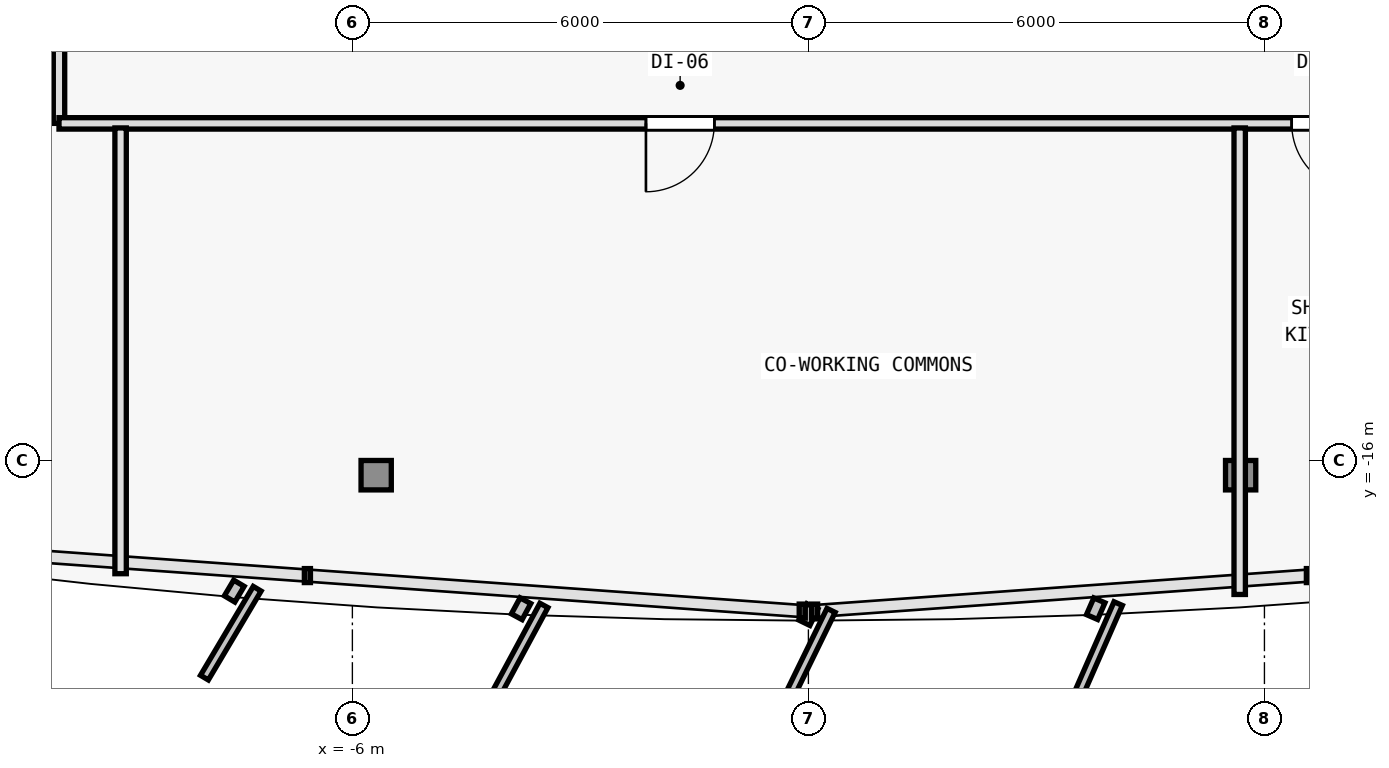
"""IFC4 building model, lengths in metres.
Left out: names, types, materials, properties, quantities, classifications, styles, units other than length and angle.
Written with IfcOpenShell. Run it as: python <this file> out.ifc"""

import sys

from ifc_helpers import new_model, si_unit, direction, frame, frame_2d, origin, origin_2d, place, context, subcontext, project, spatial, rectangle, i_section, extrude, element, fill, save


model = new_model("IFC4")
c1 = context("Model", 3, precision=1e-05, world=origin(), true_north=direction((0.0, 1.0)))
c2 = subcontext(c1, "Body", "Model", "MODEL_VIEW")
j1 = project(units=[si_unit("LENGTHUNIT", "METRE"), si_unit("PLANEANGLEUNIT", "RADIAN")], contexts=[c1])
p1 = place(None, origin())
s1 = spatial("IfcSite", under=j1, at=p1, CompositionType="ELEMENT")
p2 = place(p1, origin())
s2 = spatial("IfcBuilding", under=s1, at=p2, CompositionType="ELEMENT")
p3 = place(p2, frame((0.0, 0.0, 198.3)))
s3 = spatial("IfcBuildingStorey", under=s2, at=p3, CompositionType="ELEMENT", Elevation=198.3)
for number, where, z_axis, x_axis in (
    (1, (-5.687, -16.188, 0.005), (0.007, 0.035, 0.999), (-0.981, 0.193, 0.0)),
    (2, (5.687, -16.188, 0.005), (-0.007, 0.035, 0.999), (-0.981, -0.193, 0.0)),
):
    element("IfcColumn", number, at=place(p3, frame(where, z_axis=z_axis, x_axis=x_axis)), inside=s3, PredefinedType="COLUMN", context=c2, shape_type="SweptSolid", body=[
        extrude(i_section(OverallWidth=0.398, OverallDepth=0.387, WebThickness=0.013, FlangeThickness=0.022, FilletRadius=0.015, at=origin_2d()), origin(), (0.0, 0.0, 1.0), 3.592),
    ])
p4 = place(p3, frame((-9.86, -11.56, 0.0), z_axis=(0.0, 0.0, 1.0), x_axis=(0.0, 1.0, 0.0)))
e3 = element("IfcWall", 3, at=p4, inside=s3, PredefinedType="PARTITIONING", context=c2, shape_type="SweptSolid", body=[
    extrude(rectangle(XDim=19.986, YDim=0.15, at=frame_2d((9.993, 0.0))), origin(), (0.0, 0.0, 1.0), 2.725),
])
p5 = place(p4, frame((10.99, 0.0, 0.0)))
e4 = element("IfcOpeningElement", 4, at=p5, cuts=e3, PredefinedType="OPENING", context=c2, shape_type="SweptSolid", body=[
    extrude(rectangle(XDim=0.9, YDim=2.1, at=frame_2d((0.45, 1.05))), frame((0.0, 0.085, 0.0), z_axis=(0.0, -1.0, 0.0), x_axis=(1.0, 0.0, 0.0)), (0.0, 0.0, 1.0), 0.17),
])
p6 = place(p4, frame((8.705, 0.0, 0.0)))
e5 = element("IfcOpeningElement", 5, at=p6, cuts=e3, PredefinedType="OPENING", context=c2, shape_type="SweptSolid", body=[
    extrude(rectangle(XDim=0.9, YDim=2.1, at=frame_2d((0.45, 1.05))), frame((0.0, 0.085, 0.0), z_axis=(0.0, -1.0, 0.0), x_axis=(1.0, 0.0, 0.0)), (0.0, 0.0, 1.0), 0.17),
])
p7 = place(p4, frame((6.155, 0.0, 0.0)))
e6 = element("IfcOpeningElement", 6, at=p7, cuts=e3, PredefinedType="OPENING", context=c2, shape_type="SweptSolid", body=[
    extrude(rectangle(XDim=0.9, YDim=2.1, at=frame_2d((0.45, 1.05))), frame((0.0, 0.085, 0.0), z_axis=(0.0, -1.0, 0.0), x_axis=(1.0, 0.0, 0.0)), (0.0, 0.0, 1.0), 0.17),
])
p8 = place(p4, frame((2.282, 0.0, 0.0)))
e7 = element("IfcOpeningElement", 7, at=p8, cuts=e3, PredefinedType="OPENING", context=c2, shape_type="SweptSolid", body=[
    extrude(rectangle(XDim=0.9, YDim=2.1, at=frame_2d((0.45, 1.05))), frame((0.0, 0.085, 0.0), z_axis=(0.0, -1.0, 0.0), x_axis=(1.0, 0.0, 0.0)), (0.0, 0.0, 1.0), 0.17),
])
p9 = place(p4, frame((17.109, 0.0, 0.0)))
e8 = element("IfcOpeningElement", 8, at=p9, cuts=e3, PredefinedType="OPENING", context=c2, shape_type="SweptSolid", body=[
    extrude(rectangle(XDim=0.9, YDim=2.1, at=frame_2d((0.45, 1.05))), frame((0.0, 0.085, 0.0), z_axis=(0.0, -1.0, 0.0), x_axis=(1.0, 0.0, 0.0)), (0.0, 0.0, 1.0), 0.17),
])
p10 = place(p4, frame((13.453, 0.0, 0.0)))
e9 = element("IfcOpeningElement", 9, at=p10, cuts=e3, PredefinedType="OPENING", context=c2, shape_type="SweptSolid", body=[
    extrude(rectangle(XDim=0.9, YDim=2.1, at=frame_2d((0.45, 1.05))), frame((0.0, 0.085, 0.0), z_axis=(0.0, -1.0, 0.0), x_axis=(1.0, 0.0, 0.0)), (0.0, 0.0, 1.0), 0.17),
])
p11 = place(p3, frame((13.18, -11.56, 0.0), z_axis=(0.0, 0.0, 1.0), x_axis=(-1.0, 0.0, 0.0)))
e10 = element("IfcWall", 10, at=p11, inside=s3, PredefinedType="PARTITIONING", context=c2, shape_type="SweptSolid", body=[
    extrude(rectangle(XDim=23.04, YDim=0.15, at=frame_2d((11.52, 0.0))), origin(), (0.0, 0.0, 1.0), 2.725),
])
p12 = place(p11, frame((14.417, 0.0, 0.0)))
e11 = element("IfcOpeningElement", 11, at=p12, cuts=e10, PredefinedType="OPENING", context=c2, shape_type="SweptSolid", body=[
    extrude(rectangle(XDim=0.9, YDim=2.1, at=frame_2d((0.45, 1.05))), frame((0.0, 0.085, 0.0), z_axis=(0.0, -1.0, 0.0), x_axis=(1.0, 0.0, 0.0)), (0.0, 0.0, 1.0), 0.17),
])
p13 = place(p11, frame((5.922, 0.0, 0.0)))
e12 = element("IfcOpeningElement", 12, at=p13, cuts=e10, PredefinedType="OPENING", context=c2, shape_type="SweptSolid", body=[
    extrude(rectangle(XDim=0.9, YDim=2.1, at=frame_2d((0.45, 1.05))), frame((0.0, 0.085, 0.0), z_axis=(0.0, -1.0, 0.0), x_axis=(1.0, 0.0, 0.0)), (0.0, 0.0, 1.0), 0.17),
])
p14 = place(p11, frame((3.459, 0.0, 0.0)))
e13 = element("IfcOpeningElement", 13, at=p14, cuts=e10, PredefinedType="OPENING", context=c2, shape_type="SweptSolid", body=[
    extrude(rectangle(XDim=0.9, YDim=2.1, at=frame_2d((0.45, 1.05))), frame((0.0, 0.085, 0.0), z_axis=(0.0, -1.0, 0.0), x_axis=(1.0, 0.0, 0.0)), (0.0, 0.0, 1.0), 0.17),
])
p15 = place(p11, frame((0.929, 0.0, 0.0)))
e14 = element("IfcOpeningElement", 14, at=p15, cuts=e10, PredefinedType="OPENING", context=c2, shape_type="SweptSolid", body=[
    extrude(rectangle(XDim=0.9, YDim=2.1, at=frame_2d((0.45, 1.05))), frame((0.0, 0.085, 0.0), z_axis=(0.0, -1.0, 0.0), x_axis=(1.0, 0.0, 0.0)), (0.0, 0.0, 1.0), 0.17),
])
p16 = place(p3, frame((5.675, -11.62, 0.0), z_axis=(0.0, 0.0, 1.0), x_axis=(0.0, -1.0, 0.0)))
e15 = element("IfcWall", 15, at=p16, inside=s3, PredefinedType="PARTITIONING", context=c2, shape_type="SweptSolid", body=[
    extrude(rectangle(XDim=6.138, YDim=0.15, at=frame_2d((3.069, 0.0))), origin(), (0.0, 0.0, 1.0), 2.825),
])
p17 = place(p3, frame((-9.05, -11.62, 0.0), z_axis=(0.0, 0.0, 1.0), x_axis=(0.0, -1.0, 0.0)))
e16 = element("IfcWall", 16, at=p17, inside=s3, PredefinedType="PARTITIONING", context=c2, shape_type="SweptSolid", body=[
    extrude(rectangle(XDim=5.865, YDim=0.15, at=frame_2d((2.932, 0.0))), origin(), (0.0, 0.0, 1.0), 2.935),
])
p18 = place(p12, origin())
e17 = element("IfcDoor", 17, at=p18, inside=s3, OperationType="SINGLE_SWING_RIGHT", PredefinedType="DOOR", context=c2, shape_type="SweptSolid", body=[
    extrude(rectangle(XDim=0.9, YDim=2.1, at=frame_2d((0.45, 1.05))), frame((0.0, 0.025, 0.0), z_axis=(0.0, -1.0, 0.0), x_axis=(1.0, 0.0, 0.0)), (0.0, 0.0, 1.0), 0.05),
])
fill(e11, e17)
p19 = place(p13, origin())
e18 = element("IfcDoor", 18, at=p19, inside=s3, OperationType="SINGLE_SWING_LEFT", PredefinedType="DOOR", context=c2, shape_type="SweptSolid", body=[
    extrude(rectangle(XDim=0.9, YDim=2.1, at=frame_2d((0.45, 1.05))), frame((0.0, 0.025, 0.0), z_axis=(0.0, -1.0, 0.0), x_axis=(1.0, 0.0, 0.0)), (0.0, 0.0, 1.0), 0.05),
])
fill(e12, e18)
save(model, sys.argv[1])
